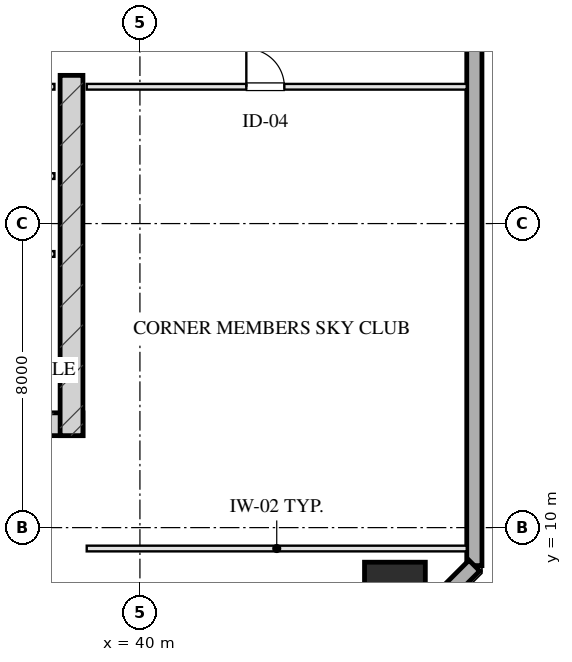
"""IFC4 building model, lengths in metres.
Left out: names, types, materials, properties, quantities, classifications, styles, units other than length and angle.
Written with IfcOpenShell. Run it as: python <this file> out.ifc"""

import sys

from ifc_helpers import new_model, si_unit, direction, frame, frame_2d, origin, origin_2d, place, context, subcontext, project, spatial, rectangle, hollow_rectangle, extrude, element, fill, save


model = new_model("IFC4")
c1 = context("Model", 3, precision=1e-05, world=origin(), true_north=direction((0.0, 1.0)))
c2 = subcontext(c1, "Body", "Model", "MODEL_VIEW")
j1 = project(units=[si_unit("LENGTHUNIT", "METRE"), si_unit("PLANEANGLEUNIT", "RADIAN")], contexts=[c1])
p1 = place(None, origin())
s1 = spatial("IfcSite", under=j1, at=p1, CompositionType="ELEMENT")
p2 = place(p1, origin())
s2 = spatial("IfcBuilding", under=s1, at=p2, CompositionType="ELEMENT")
p3 = place(p2, frame((0.0, 0.0, 156.4)))
s3 = spatial("IfcBuildingStorey", under=s2, at=p3, CompositionType="ELEMENT", Elevation=156.4)
p4 = place(p3, frame((21.5, 12.72, 0.0), z_axis=(0.0, 0.0, 1.0), x_axis=(1.0, 0.0, 0.0)))
e1 = element("IfcWall", 1, at=p4, inside=s3, PredefinedType="SHEAR", context=c2, shape_type="SweptSolid", body=[
    extrude(rectangle(XDim=17.0, YDim=0.6, at=frame_2d((8.5, 0.0))), origin(), (0.0, 0.0, 1.0), 3.45),
])
p5 = place(p3, frame((38.2, 21.9, 0.0), z_axis=(0.0, 0.0, 1.0), x_axis=(0.0, -1.0, 0.0)))
e2 = element("IfcWall", 2, at=p5, inside=s3, PredefinedType="SHEAR", context=c2, shape_type="SweptSolid", body=[
    extrude(rectangle(XDim=9.48, YDim=0.6, at=frame_2d((4.74, 0.0))), origin(), (0.0, 0.0, 1.0), 3.45),
])
p6 = place(p3, frame((46.71, 8.29, 0.0), z_axis=(0.0, 0.0, 1.0), x_axis=(1.0, 0.0, 0.0)))
e3 = element("IfcColumn", 3, at=p6, inside=s3, PredefinedType="COLUMN", context=c2, shape_type="SweptSolid", body=[
    extrude(hollow_rectangle(XDim=1.6, YDim=1.6, WallThickness=0.055, at=origin_2d()), origin(), (0.0, 0.0, 1.0), 3.451),
])
p7 = place(p3, frame((48.8, 59.0, 0.0), z_axis=(0.0, 0.0, 1.0), x_axis=(0.0, -1.0, 0.0)))
e4 = element("IfcWall", 4, at=p7, inside=s3, PredefinedType="SOLIDWALL", context=c2, shape_type="SweptSolid", body=[
    extrude(rectangle(XDim=50.0, YDim=0.4, at=frame_2d((25.0, 0.0))), origin(), (0.0, 0.0, 1.0), 2.61),
])
p8 = place(p7, frame((21.35, 0.0, 0.0)))
e5 = element("IfcOpeningElement", 5, at=p8, cuts=e4, PredefinedType="OPENING", context=c2, shape_type="SweptSolid", body=[
    extrude(rectangle(XDim=1.1, YDim=2.15, at=frame_2d((0.55, 1.075))), frame((0.0, 0.21, 0.0), z_axis=(0.0, -1.0, 0.0), x_axis=(1.0, 0.0, 0.0)), (0.0, 0.0, 1.0), 0.42),
])
p9 = place(p3, frame((48.8, 9.0, 0.0), z_axis=(0.0, 0.0, 1.0), x_axis=(-0.707106781187, -0.707106781187, 0.0)))
e6 = element("IfcWall", 6, at=p9, inside=s3, PredefinedType="SOLIDWALL", context=c2, shape_type="SweptSolid", body=[
    extrude(rectangle(XDim=3.96, YDim=0.4, at=frame_2d((1.98, 0.0))), origin(), (0.0, 0.0, 1.0), 2.61),
])
p10 = place(p3, frame((33.95, 21.6, 0.0), z_axis=(0.0, 0.0, 1.0), x_axis=(1.0, 0.0, 0.0)))
e7 = element("IfcWall", 7, at=p10, inside=s3, PredefinedType="PARTITIONING", context=c2, shape_type="SweptSolid", body=[
    extrude(rectangle(XDim=3.8, YDim=0.15, at=frame_2d((1.9, 0.0))), origin(), (0.0, 0.0, 1.0), 3.175),
])
p11 = place(p10, frame((0.22, 0.0, 0.0)))
e8 = element("IfcOpeningElement", 8, at=p11, cuts=e7, PredefinedType="OPENING", context=c2, shape_type="SweptSolid", body=[
    extrude(rectangle(XDim=0.95, YDim=2.05, at=frame_2d((0.475, 1.025))), frame((0.0, 0.085, 0.0), z_axis=(0.0, -1.0, 0.0), x_axis=(1.0, 0.0, 0.0)), (0.0, 0.0, 1.0), 0.17),
])
p12 = place(p10, frame((1.95, 0.0, 0.0)))
e9 = element("IfcOpeningElement", 9, at=p12, cuts=e7, PredefinedType="OPENING", context=c2, shape_type="SweptSolid", body=[
    extrude(rectangle(XDim=0.9, YDim=2.05, at=frame_2d((0.45, 1.025))), frame((0.0, 0.085, 0.0), z_axis=(0.0, -1.0, 0.0), x_axis=(1.0, 0.0, 0.0)), (0.0, 0.0, 1.0), 0.17),
])
for number, where, z_axis, x_axis in (
    (10, (35.45, 17.2, 0.0), (0.0, 0.0, 1.0), (1.0, 0.0, 0.0)),
    (11, (35.45, 19.25, 0.0), (0.0, 0.0, 1.0), (1.0, 0.0, 0.0)),
):
    element("IfcWall", number, at=place(p3, frame(where, z_axis=z_axis, x_axis=x_axis)), inside=s3, PredefinedType="PARTITIONING", context=c2, shape_type="SweptSolid", body=[
        extrude(rectangle(XDim=2.3, YDim=0.15, at=frame_2d((1.15, 0.0))), origin(), (0.0, 0.0, 1.0), 3.175),
    ])
p13 = place(p3, frame((38.6, 9.45, 0.0), z_axis=(0.0, 0.0, 1.0), x_axis=(1.0, 0.0, 0.0)))
e12 = element("IfcWall", 12, at=p13, inside=s3, PredefinedType="PARTITIONING", context=c2, shape_type="SweptSolid", body=[
    extrude(rectangle(XDim=10.0, YDim=0.15, at=frame_2d((5.0, 0.0))), origin(), (0.0, 0.0, 1.0), 3.175),
])
p14 = place(p3, frame((38.6, 21.6, 0.0), z_axis=(0.0, 0.0, 1.0), x_axis=(1.0, 0.0, 0.0)))
e13 = element("IfcWall", 13, at=p14, inside=s3, PredefinedType="PARTITIONING", context=c2, shape_type="SweptSolid", body=[
    extrude(rectangle(XDim=10.0, YDim=0.15, at=frame_2d((5.0, 0.0))), origin(), (0.0, 0.0, 1.0), 2.15),
])
p15 = place(p14, frame((4.2, 0.0, 0.0)))
e14 = element("IfcOpeningElement", 14, at=p15, cuts=e13, PredefinedType="OPENING", context=c2, shape_type="SweptSolid", body=[
    extrude(rectangle(XDim=1.0, YDim=2.05, at=frame_2d((0.5, 1.025))), frame((0.0, 0.085, 0.0), z_axis=(0.0, -1.0, 0.0), x_axis=(1.0, 0.0, 0.0)), (0.0, 0.0, 1.0), 0.17),
])
p16 = place(p15, origin())
e15 = element("IfcDoor", 15, at=p16, inside=s3, OperationType="SINGLE_SWING_LEFT", PredefinedType="DOOR", context=c2, shape_type="SweptSolid", body=[
    extrude(rectangle(XDim=1.0, YDim=2.05, at=frame_2d((0.5, 1.025))), frame((0.0, 0.025, 0.0), z_axis=(0.0, -1.0, 0.0), x_axis=(1.0, 0.0, 0.0)), (0.0, 0.0, 1.0), 0.05),
])
fill(e14, e15)
save(model, sys.argv[1])
